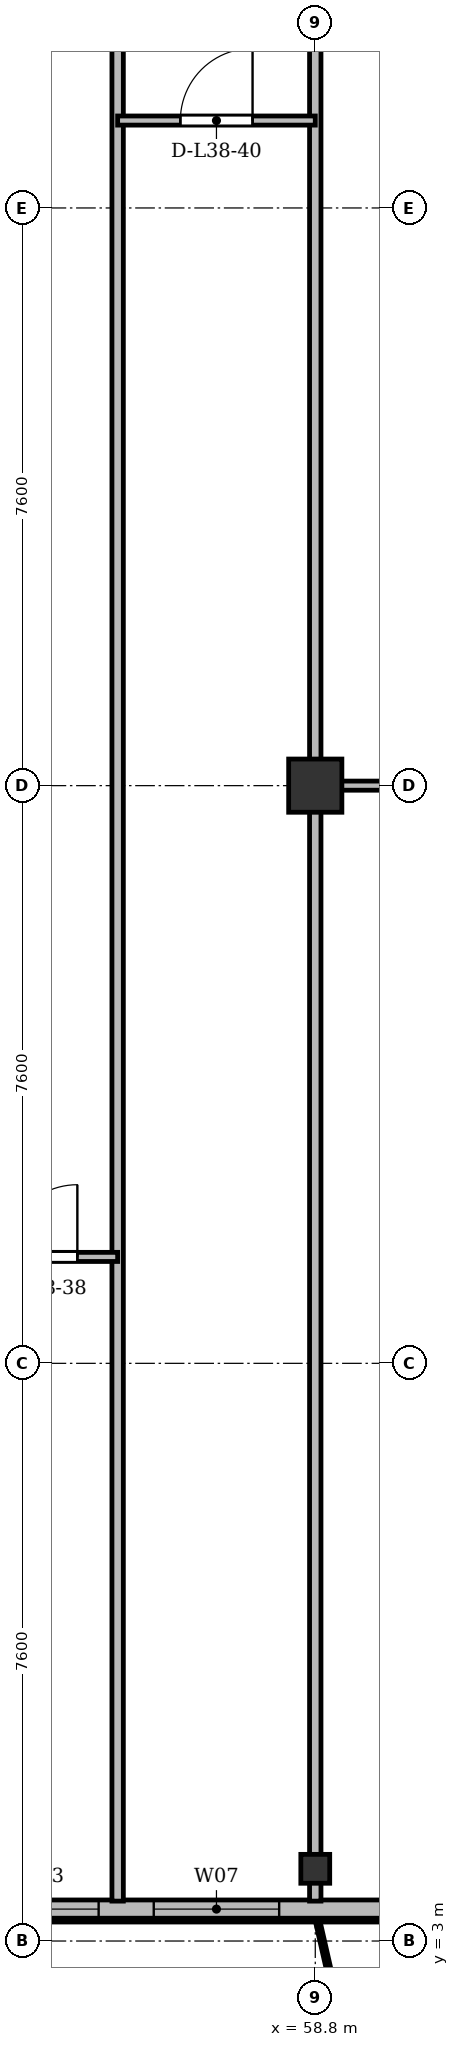
"""IFC4 building model, lengths in metres.
Left out: names, types, materials, properties, quantities, classifications, styles, units other than length and angle.
Written with IfcOpenShell. Run it as: python <this file> out.ifc"""

import sys

from ifc_helpers import new_model, si_unit, direction, frame, frame_2d, origin, origin_2d, place, context, subcontext, project, spatial, rectangle, i_section, extrude, source, transform, mapped, element, fill, save


model = new_model("IFC4")
c1 = context("Model", 3, precision=1e-05, world=origin(), true_north=direction((0.0, 1.0)))
c2 = subcontext(c1, "Body", "Model", "MODEL_VIEW")
j1 = project(units=[si_unit("LENGTHUNIT", "METRE"), si_unit("PLANEANGLEUNIT", "RADIAN")], contexts=[c1])
p1 = place(None, origin())
s1 = spatial("IfcSite", under=j1, at=p1, CompositionType="ELEMENT")
p2 = place(p1, origin())
s2 = spatial("IfcBuilding", under=s1, at=p2, CompositionType="ELEMENT")
p3 = place(p2, frame((0.0, 0.0, 146.5)))
s3 = spatial("IfcBuildingStorey", under=s2, at=p3, CompositionType="ELEMENT", Elevation=146.5)
m1 = source(origin(), c2, "Body", "SweptSolid", [
    extrude(i_section(OverallWidth=0.38, OverallDepth=0.38, WebThickness=0.02, FlangeThickness=0.03, at=origin_2d()), origin(), (0.0, 0.0, 1.0), 3.6),
])
p4 = place(p3, frame((58.8, 3.95, 0.0), z_axis=(0.0, 0.0, 1.0), x_axis=(1.0, 0.0, 0.0)))
e1 = element("IfcColumn", 1, at=p4, inside=s3, PredefinedType="COLUMN", context=c2, shape_type="MappedRepresentation", body=[
    mapped(m1, transform((0.0, 0.0, 0.0), x_axis=(1.0, 0.0, 0.0), y_axis=(0.0, 1.0, 0.0), z_axis=(0.0, 0.0, 1.0), scale=1.0)),
])
m2 = source(origin(), c2, "Body", "SweptSolid", [
    extrude(rectangle(XDim=0.7, YDim=0.7, at=origin_2d()), origin(), (0.0, 0.0, 1.0), 3.6),
])
p5 = place(p3, frame((58.8, 18.2, 0.0), z_axis=(0.0, 0.0, 1.0), x_axis=(1.0, 0.0, 0.0)))
e2 = element("IfcColumn", 2, at=p5, inside=s3, PredefinedType="COLUMN", context=c2, shape_type="MappedRepresentation", body=[
    mapped(m2, transform((0.0, 0.0, 0.0), x_axis=(1.0, 0.0, 0.0), y_axis=(0.0, 1.0, 0.0), z_axis=(0.0, 0.0, 1.0), scale=1.0)),
])
p6 = place(p3, frame((63.6, 3.42, 0.0), z_axis=(0.0, 0.0, 1.0), x_axis=(-1.0, 0.0, 0.0)))
e3 = element("IfcWall", 3, at=p6, inside=s3, PredefinedType="SOLIDWALL", context=c2, shape_type="SweptSolid", body=[
    extrude(rectangle(XDim=52.8, YDim=0.24, at=frame_2d((26.4, 0.0))), origin(), (0.0, 0.0, 1.0), 3.35),
])
p7 = place(p6, frame((1.445, 0.0, 0.9)))
e4 = element("IfcOpeningElement", 4, at=p7, cuts=e3, PredefinedType="OPENING", context=c2, shape_type="SweptSolid", body=[
    extrude(rectangle(XDim=2.0, YDim=1.95, at=frame_2d((1.0, 0.975))), frame((0.0, 0.13, 0.0), z_axis=(0.0, -1.0, 0.0), x_axis=(1.0, 0.0, 0.0)), (0.0, 0.0, 1.0), 0.26),
])
p8 = place(p6, frame((5.275, 0.0, 0.9)))
e5 = element("IfcOpeningElement", 5, at=p8, cuts=e3, PredefinedType="OPENING", context=c2, shape_type="SweptSolid", body=[
    extrude(rectangle(XDim=1.65, YDim=1.85, at=frame_2d((0.825, 0.925))), frame((0.0, 0.13, 0.0), z_axis=(0.0, -1.0, 0.0), x_axis=(1.0, 0.0, 0.0)), (0.0, 0.0, 1.0), 0.26),
])
p9 = place(p6, frame((7.65, 0.0, 0.9)))
e6 = element("IfcOpeningElement", 6, at=p9, cuts=e3, PredefinedType="OPENING", context=c2, shape_type="SweptSolid", body=[
    extrude(rectangle(XDim=1.5, YDim=1.75, at=frame_2d((0.75, 0.875))), frame((0.0, 0.13, 0.0), z_axis=(0.0, -1.0, 0.0), x_axis=(1.0, 0.0, 0.0)), (0.0, 0.0, 1.0), 0.26),
])
p10 = place(p6, frame((9.9, 0.0, 0.9)))
e7 = element("IfcOpeningElement", 7, at=p10, cuts=e3, PredefinedType="OPENING", context=c2, shape_type="SweptSolid", body=[
    extrude(rectangle(XDim=2.2, YDim=1.8, at=frame_2d((1.1, 0.9))), frame((0.0, 0.13, 0.0), z_axis=(0.0, -1.0, 0.0), x_axis=(1.0, 0.0, 0.0)), (0.0, 0.0, 1.0), 0.26),
])
p11 = place(p6, frame((14.417, 0.0, 0.0)))
e8 = element("IfcOpeningElement", 8, at=p11, cuts=e3, PredefinedType="OPENING", context=c2, shape_type="SweptSolid", body=[
    extrude(rectangle(XDim=1.2, YDim=2.2, at=frame_2d((0.6, 1.1))), frame((0.0, 0.13, 0.0), z_axis=(0.0, -1.0, 0.0), x_axis=(1.0, 0.0, 0.0)), (0.0, 0.0, 1.0), 0.26),
])
p12 = place(p6, frame((25.4, 0.0, 0.9)))
e9 = element("IfcOpeningElement", 9, at=p12, cuts=e3, PredefinedType="OPENING", context=c2, shape_type="SweptSolid", body=[
    extrude(rectangle(XDim=2.0, YDim=1.95, at=frame_2d((1.0, 0.975))), frame((0.0, 0.13, 0.0), z_axis=(0.0, -1.0, 0.0), x_axis=(1.0, 0.0, 0.0)), (0.0, 0.0, 1.0), 0.26),
])
p13 = place(p6, frame((35.775, 0.0, 0.9)))
e10 = element("IfcOpeningElement", 10, at=p13, cuts=e3, PredefinedType="OPENING", context=c2, shape_type="SweptSolid", body=[
    extrude(rectangle(XDim=1.65, YDim=1.85, at=frame_2d((0.825, 0.925))), frame((0.0, 0.13, 0.0), z_axis=(0.0, -1.0, 0.0), x_axis=(1.0, 0.0, 0.0)), (0.0, 0.0, 1.0), 0.26),
])
p14 = place(p6, frame((41.656, 0.0, 0.0)))
e11 = element("IfcOpeningElement", 11, at=p14, cuts=e3, PredefinedType="OPENING", context=c2, shape_type="SweptSolid", body=[
    extrude(rectangle(XDim=1.2, YDim=2.2, at=frame_2d((0.6, 1.1))), frame((0.0, 0.13, 0.0), z_axis=(0.0, -1.0, 0.0), x_axis=(1.0, 0.0, 0.0)), (0.0, 0.0, 1.0), 0.26),
])
p15 = place(p6, frame((43.65, 0.0, 0.9)))
e12 = element("IfcOpeningElement", 12, at=p15, cuts=e3, PredefinedType="OPENING", context=c2, shape_type="SweptSolid", body=[
    extrude(rectangle(XDim=1.5, YDim=1.75, at=frame_2d((0.75, 0.875))), frame((0.0, 0.13, 0.0), z_axis=(0.0, -1.0, 0.0), x_axis=(1.0, 0.0, 0.0)), (0.0, 0.0, 1.0), 0.26),
])
p16 = place(p6, frame((45.95, 0.0, 0.9)))
e13 = element("IfcOpeningElement", 13, at=p16, cuts=e3, PredefinedType="OPENING", context=c2, shape_type="SweptSolid", body=[
    extrude(rectangle(XDim=1.5, YDim=1.75, at=frame_2d((0.75, 0.875))), frame((0.0, 0.13, 0.0), z_axis=(0.0, -1.0, 0.0), x_axis=(1.0, 0.0, 0.0)), (0.0, 0.0, 1.0), 0.26),
])
p17 = place(p6, frame((49.355, 0.0, 0.9)))
e14 = element("IfcOpeningElement", 14, at=p17, cuts=e3, PredefinedType="OPENING", context=c2, shape_type="SweptSolid", body=[
    extrude(rectangle(XDim=2.0, YDim=1.95, at=frame_2d((1.0, 0.975))), frame((0.0, 0.13, 0.0), z_axis=(0.0, -1.0, 0.0), x_axis=(1.0, 0.0, 0.0)), (0.0, 0.0, 1.0), 0.26),
])
p18 = place(p3, frame((58.8, 3.525, 0.0), z_axis=(0.0, 0.0, 1.0), x_axis=(0.0, 1.0, 0.0)))
e15 = element("IfcWall", 15, at=p18, inside=s3, PredefinedType="PARTITIONING", context=c2, shape_type="SweptSolid", body=[
    extrude(rectangle(XDim=27.275, YDim=0.15, at=frame_2d((13.638, 0.0))), origin(), (0.0, 0.0, 1.0), 2.85),
])
p19 = place(p3, frame((56.2, 3.525, 0.0), z_axis=(0.0, 0.0, 1.0), x_axis=(0.0, 1.0, 0.0)))
e16 = element("IfcWall", 16, at=p19, inside=s3, PredefinedType="PARTITIONING", context=c2, shape_type="SweptSolid", body=[
    extrude(rectangle(XDim=27.275, YDim=0.15, at=frame_2d((13.638, 0.0))), origin(), (0.0, 0.0, 1.0), 2.75),
])
p20 = place(p3, frame((54.2, 12.0, 0.0), z_axis=(0.0, 0.0, 1.0), x_axis=(1.0, 0.0, 0.0)))
e17 = element("IfcWall", 17, at=p20, inside=s3, PredefinedType="PARTITIONING", context=c2, shape_type="SweptSolid", body=[
    extrude(rectangle(XDim=2.0, YDim=0.12, at=frame_2d((1.0, 0.0))), origin(), (0.0, 0.0, 1.0), 3.35),
])
p21 = place(p20, frame((0.52, 0.0, 0.0)))
e18 = element("IfcOpeningElement", 18, at=p21, cuts=e17, PredefinedType="OPENING", context=c2, shape_type="SweptSolid", body=[
    extrude(rectangle(XDim=0.95, YDim=2.15, at=frame_2d((0.475, 1.075))), frame((0.0, 0.07, 0.0), z_axis=(0.0, -1.0, 0.0), x_axis=(1.0, 0.0, 0.0)), (0.0, 0.0, 1.0), 0.14),
])
p22 = place(p3, frame((56.2, 26.95, 0.0), z_axis=(0.0, 0.0, 1.0), x_axis=(1.0, 0.0, 0.0)))
e19 = element("IfcWall", 19, at=p22, inside=s3, PredefinedType="PARTITIONING", context=c2, shape_type="SweptSolid", body=[
    extrude(rectangle(XDim=2.6, YDim=0.12, at=frame_2d((1.3, 0.0))), origin(), (0.0, 0.0, 1.0), 2.85),
])
p23 = place(p22, frame((0.825, 0.0, 0.0)))
e20 = element("IfcOpeningElement", 20, at=p23, cuts=e19, PredefinedType="OPENING", context=c2, shape_type="SweptSolid", body=[
    extrude(rectangle(XDim=0.95, YDim=2.15, at=frame_2d((0.475, 1.075))), frame((0.0, 0.07, 0.0), z_axis=(0.0, -1.0, 0.0), x_axis=(1.0, 0.0, 0.0)), (0.0, 0.0, 1.0), 0.14),
])
p24 = place(p3, frame((58.8, 18.2, 0.0), z_axis=(0.0, 0.0, 1.0), x_axis=(1.0, 0.0, 0.0)))
e21 = element("IfcWall", 21, at=p24, inside=s3, PredefinedType="PARTITIONING", context=c2, shape_type="SweptSolid", body=[
    extrude(rectangle(XDim=7.575, YDim=0.12, at=frame_2d((3.788, 0.0))), origin(), (0.0, 0.0, 1.0), 2.75),
])
p25 = place(p24, frame((3.313, 0.0, 0.0)))
e22 = element("IfcOpeningElement", 22, at=p25, cuts=e21, PredefinedType="OPENING", context=c2, shape_type="SweptSolid", body=[
    extrude(rectangle(XDim=0.95, YDim=2.15, at=frame_2d((0.475, 1.075))), frame((0.0, 0.07, 0.0), z_axis=(0.0, -1.0, 0.0), x_axis=(1.0, 0.0, 0.0)), (0.0, 0.0, 1.0), 0.14),
])
m3 = source(origin(), c2, "Body", "SweptSolid", [
    extrude(rectangle(XDim=1.65, YDim=1.85, at=frame_2d((0.825, 0.925))), frame((0.0, 0.03, 0.0), z_axis=(0.0, -1.0, 0.0), x_axis=(1.0, 0.0, 0.0)), (0.0, 0.0, 1.0), 0.06),
])
p26 = place(p8, origin())
e23 = element("IfcWindow", 23, at=p26, inside=s3, PartitioningType="SINGLE_PANEL", PredefinedType="WINDOW", context=c2, shape_type="MappedRepresentation", body=[
    mapped(m3, transform((0.0, 0.0, 0.0), x_axis=(1.0, 0.0, 0.0), y_axis=(0.0, 1.0, 0.0), z_axis=(0.0, 0.0, 1.0), scale=1.0)),
])
fill(e5, e23)
m4 = source(origin(), c2, "Body", "SweptSolid", [
    extrude(rectangle(XDim=1.5, YDim=1.75, at=frame_2d((0.75, 0.875))), frame((0.0, 0.03, 0.0), z_axis=(0.0, -1.0, 0.0), x_axis=(1.0, 0.0, 0.0)), (0.0, 0.0, 1.0), 0.06),
])
p27 = place(p9, origin())
e24 = element("IfcWindow", 24, at=p27, inside=s3, PartitioningType="SINGLE_PANEL", PredefinedType="WINDOW", context=c2, shape_type="MappedRepresentation", body=[
    mapped(m4, transform((0.0, 0.0, 0.0), x_axis=(1.0, 0.0, 0.0), y_axis=(0.0, 1.0, 0.0), z_axis=(0.0, 0.0, 1.0), scale=1.0)),
])
fill(e6, e24)
m5 = source(origin(), c2, "Body", "SweptSolid", [
    extrude(rectangle(XDim=0.95, YDim=2.15, at=frame_2d((0.475, 1.075))), frame((0.0, 0.025, 0.0), z_axis=(0.0, -1.0, 0.0), x_axis=(1.0, 0.0, 0.0)), (0.0, 0.0, 1.0), 0.05),
])
p28 = place(p21, origin())
e25 = element("IfcDoor", 25, at=p28, inside=s3, OperationType="SINGLE_SWING_RIGHT", PredefinedType="DOOR", context=c2, shape_type="MappedRepresentation", body=[
    mapped(m5, transform((0.0, 0.0, 0.0), x_axis=(1.0, 0.0, 0.0), y_axis=(0.0, 1.0, 0.0), z_axis=(0.0, 0.0, 1.0), scale=1.0)),
])
fill(e18, e25)
p29 = place(p23, origin())
e26 = element("IfcDoor", 26, at=p29, inside=s3, OperationType="SINGLE_SWING_RIGHT", PredefinedType="DOOR", context=c2, shape_type="MappedRepresentation", body=[
    mapped(m5, transform((0.0, 0.0, 0.0), x_axis=(1.0, 0.0, 0.0), y_axis=(0.0, 1.0, 0.0), z_axis=(0.0, 0.0, 1.0), scale=1.0)),
])
fill(e20, e26)
save(model, sys.argv[1])
